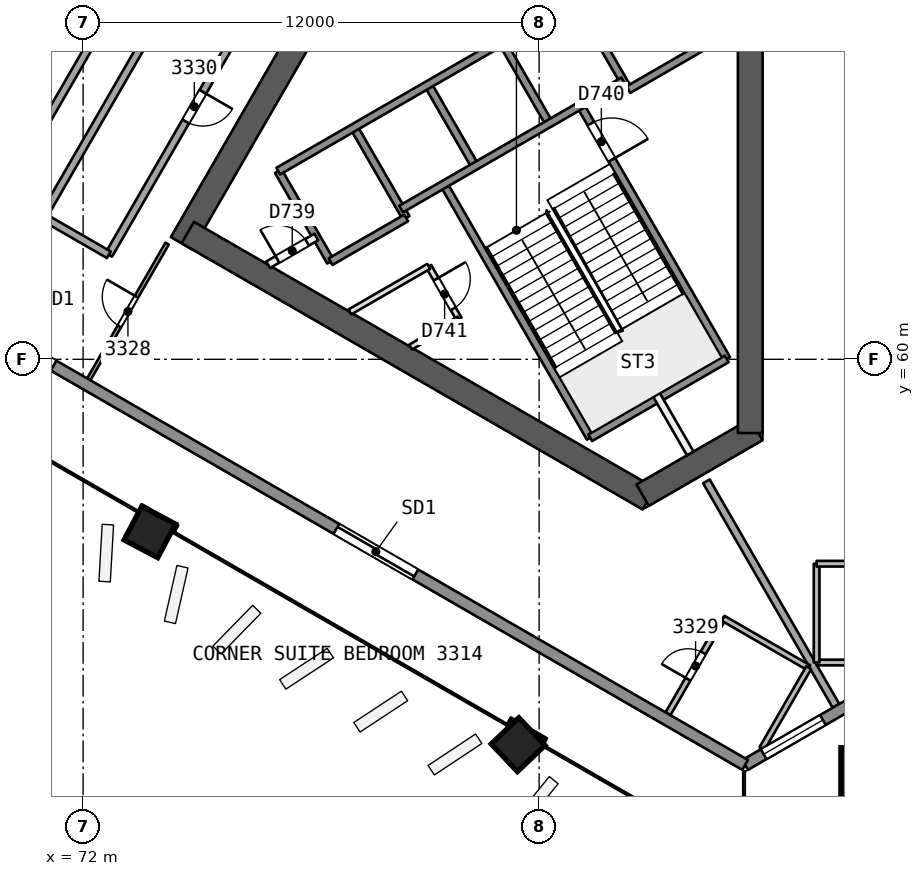
"""IFC4 building model, lengths in metres.
Left out: names, types, materials, properties, quantities, classifications, styles, units other than length and angle.
Written with IfcOpenShell. Run it as: python <this file> out.ifc"""

import sys

from ifc_helpers import new_model, si_unit, direction, frame, frame_2d, origin, origin_2d, place, context, subcontext, project, spatial, rectangle, extrude, element, fill, save


model = new_model("IFC4")
c1 = context("Model", 3, precision=1e-05, world=origin(), true_north=direction((0.0, 1.0)))
c2 = subcontext(c1, "Body", "Model", "MODEL_VIEW")
j1 = project(units=[si_unit("LENGTHUNIT", "METRE"), si_unit("PLANEANGLEUNIT", "RADIAN")], contexts=[c1])
p1 = place(None, origin())
s1 = spatial("IfcSite", under=j1, at=p1, CompositionType="ELEMENT")
p2 = place(p1, origin())
s2 = spatial("IfcBuilding", under=s1, at=p2, CompositionType="ELEMENT")
p3 = place(p2, frame((0.0, 0.0, 136.4)))
s3 = spatial("IfcBuildingStorey", under=s2, at=p3, CompositionType="ELEMENT", Elevation=136.4)
p4 = place(p3, frame((79.688, 71.881, 0.0), z_axis=(0.0, 0.0, 1.0), x_axis=(-0.49999822179, -0.866026430432, 0.0)))
e1 = element("IfcWall", 1, at=p4, inside=s3, PredefinedType="SHEAR", context=c2, shape_type="SweptSolid", body=[
    extrude(rectangle(XDim=10.192, YDim=0.65, at=frame_2d((5.096, 0.0))), origin(), (0.0, 0.0, 1.0), 3.7),
])
p5 = place(p4, frame((0.762, 0.0, 0.0)))
e2 = element("IfcOpeningElement", 2, at=p5, cuts=e1, PredefinedType="OPENING", context=c2, shape_type="SweptSolid", body=[
    extrude(rectangle(XDim=1.2, YDim=2.1, at=frame_2d((0.6, 1.05))), frame((0.0, 0.335, 0.0), z_axis=(0.0, -1.0, 0.0), x_axis=(1.0, 0.0, 0.0)), (0.0, 0.0, 1.0), 0.671),
])
p6 = place(p3, frame((74.754, 63.335, 0.0), z_axis=(0.0, 0.0, 1.0), x_axis=(0.866026250715, -0.49999853307, 0.0)))
e3 = element("IfcWall", 3, at=p6, inside=s3, PredefinedType="SHEAR", context=c2, shape_type="SweptSolid", body=[
    extrude(rectangle(XDim=14.008, YDim=0.65, at=frame_2d((7.004, 0.0))), origin(), (0.0, 0.0, 1.0), 3.7),
])
p7 = place(p3, frame((86.723, 56.425, 0.0), z_axis=(0.0, 0.0, 1.0), x_axis=(0.866031550877, 0.499989352773, 0.0)))
e4 = element("IfcWall", 4, at=p7, inside=s3, PredefinedType="SHEAR", context=c2, shape_type="SweptSolid", body=[
    extrude(rectangle(XDim=3.458, YDim=0.65, at=frame_2d((1.729, 0.0))), origin(), (0.0, 0.0, 1.0), 3.7),
])
p8 = place(p3, frame((89.555, 58.06, 0.0), z_axis=(0.0, 0.0, 1.0), x_axis=(0.0, 1.0, 0.0)))
e5 = element("IfcWall", 5, at=p8, inside=s3, PredefinedType="SHEAR", context=c2, shape_type="SweptSolid", body=[
    extrude(rectangle(XDim=14.146, YDim=0.65, at=frame_2d((7.073, 0.0))), origin(), (0.0, 0.0, 1.0), 3.7),
])
p9 = place(p3, frame((73.753, 55.43, 0.0), z_axis=(0.000857522362, 0.02282328747, 0.99973914708), x_axis=(-0.499939350713, -0.86582493015, 0.020194948363)))
e6 = element("IfcColumn", 6, at=p9, inside=s3, PredefinedType="COLUMN", context=c2, shape_type="SweptSolid", body=[
    extrude(rectangle(XDim=1.0, YDim=1.0, at=origin_2d()), origin(), (0.0, 0.0, 1.0), 3.701),
])
p10 = place(p3, frame((83.457, 49.827, 0.0), z_axis=(-0.008375917711, 0.028095597993, 0.999570148302), x_axis=(-0.499671879215, -0.865980278095, 0.020153686316)))
e7 = element("IfcColumn", 7, at=p10, inside=s3, PredefinedType="COLUMN", context=c2, shape_type="SweptSolid", body=[
    extrude(rectangle(XDim=1.0, YDim=1.0, at=origin_2d()), origin(), (0.0, 0.0, 1.0), 3.702),
])
p11 = place(p3, frame((93.161, 48.544, 0.0), z_axis=(-0.017605877014, 0.030464101799, 0.99938079409), x_axis=(-0.865809063816, -0.500374524745, 1.32647e-07)))
e8 = element("IfcColumn", 8, at=p11, inside=s3, PredefinedType="COLUMN", context=c2, shape_type="SweptSolid", body=[
    extrude(rectangle(XDim=2.4, YDim=2.4, at=origin_2d()), origin(), (0.0, 0.0, 1.0), 3.702),
])
p12 = place(p3, frame((93.788, 52.022, 0.0), z_axis=(0.0, 0.0, 1.0), x_axis=(-1.0, 0.0, 0.0)))
e9 = element("IfcWall", 9, at=p12, inside=s3, PredefinedType="PARTITIONING", context=c2, shape_type="SweptSolid", body=[
    extrude(rectangle(XDim=2.487, YDim=0.15, at=frame_2d((1.243, 0.0))), origin(), (0.0, 0.0, 1.0), 3.25),
])
p13 = place(p3, frame((91.302, 52.022, 0.0), z_axis=(0.0, 0.0, 1.0), x_axis=(0.0, 1.0, 0.0)))
e10 = element("IfcWall", 10, at=p13, inside=s3, PredefinedType="PARTITIONING", context=c2, shape_type="SweptSolid", body=[
    extrude(rectangle(XDim=2.6, YDim=0.15, at=frame_2d((1.3, 0.0))), origin(), (0.0, 0.0, 1.0), 3.25),
])
p14 = place(p3, frame((91.302, 54.622, 0.0), z_axis=(0.0, 0.0, 1.0), x_axis=(1.0, 0.0, 0.0)))
e11 = element("IfcWall", 11, at=p14, inside=s3, PredefinedType="PARTITIONING", context=c2, shape_type="SweptSolid", body=[
    extrude(rectangle(XDim=2.9, YDim=0.15, at=frame_2d((1.45, 0.0))), origin(), (0.0, 0.0, 1.0), 3.25),
])
p15 = place(p14, frame((1.05, 0.0, 0.0)))
e12 = element("IfcOpeningElement", 12, at=p15, cuts=e11, PredefinedType="OPENING", context=c2, shape_type="SweptSolid", body=[
    extrude(rectangle(XDim=0.8, YDim=2.1, at=frame_2d((0.4, 1.05))), frame((0.0, 0.085, 0.0), z_axis=(0.0, -1.0, 0.0), x_axis=(1.0, 0.0, 0.0)), (0.0, 0.0, 1.0), 0.171),
])
p16 = place(p3, frame((88.401, 56.789, 0.0), z_axis=(0.0, 0.0, 1.0), x_axis=(0.499980624807, -0.866036589769, 0.0)))
e13 = element("IfcWall", 13, at=p16, inside=s3, PredefinedType="PARTITIONING", context=c2, shape_type="SweptSolid", body=[
    extrude(rectangle(XDim=6.822, YDim=0.2, at=frame_2d((3.411, 0.0))), origin(), (0.0, 0.0, 1.0), 3.25),
])
p17 = place(p3, frame((68.369, 61.655, 0.0), z_axis=(0.0, 0.0, 1.0), x_axis=(0.499987870058, 0.866032406896, 0.0)))
e14 = element("IfcWall", 14, at=p17, inside=s3, PredefinedType="PARTITIONING", context=c2, shape_type="SweptSolid", body=[
    extrude(rectangle(XDim=12.103, YDim=0.2, at=frame_2d((6.051, 0.0))), origin(), (0.0, 0.0, 1.0), 3.25),
])
p18 = place(p3, frame((72.148, 59.473, 0.0), z_axis=(0.0, 0.0, 1.0), x_axis=(0.499997465321, 0.866026867177, 0.0)))
e15 = element("IfcWall", 15, at=p18, inside=s3, PredefinedType="PARTITIONING", context=c2, shape_type="SweptSolid", body=[
    extrude(rectangle(XDim=4.124, YDim=0.1, at=frame_2d((2.062, 0.0))), origin(), (0.0, 0.0, 1.0), 3.25),
])
p19 = place(p18, frame((1.612, 0.0, 0.0)))
e16 = element("IfcOpeningElement", 16, at=p19, cuts=e15, PredefinedType="OPENING", context=c2, shape_type="SweptSolid", body=[
    extrude(rectangle(XDim=0.9, YDim=2.1, at=frame_2d((0.45, 1.05))), frame((0.0, 0.061, 0.0), z_axis=(0.0, -1.0, 0.0), x_axis=(1.0, 0.0, 0.0)), (0.0, 0.0, 1.0), 0.121),
])
p20 = place(p3, frame((77.176, 70.545, 0.0), z_axis=(0.0, 0.0, 1.0), x_axis=(-0.499990139034, -0.866031096941, 0.0)))
e17 = element("IfcWall", 17, at=p20, inside=s3, PredefinedType="PARTITIONING", context=c2, shape_type="SweptSolid", body=[
    extrude(rectangle(XDim=9.0, YDim=0.2, at=frame_2d((4.5, 0.0))), origin(), (0.0, 0.0, 1.0), 3.25),
])
p21 = place(p20, frame((4.05, 0.0, 0.0)))
e18 = element("IfcOpeningElement", 18, at=p21, cuts=e17, PredefinedType="OPENING", context=c2, shape_type="SweptSolid", body=[
    extrude(rectangle(XDim=0.9, YDim=2.1, at=frame_2d((0.45, 1.05))), frame((0.0, 0.11, 0.0), z_axis=(0.0, -1.0, 0.0), x_axis=(1.0, 0.0, 0.0)), (0.0, 0.0, 1.0), 0.221),
])
p22 = place(p3, frame((72.676, 62.751, 0.0), z_axis=(0.0, 0.0, 1.0), x_axis=(-0.866010750942, 0.50002537861, 0.0)))
e19 = element("IfcWall", 19, at=p22, inside=s3, PredefinedType="PARTITIONING", context=c2, shape_type="SweptSolid", body=[
    extrude(rectangle(XDim=2.0, YDim=0.2, at=frame_2d((1.0, 0.0))), origin(), (0.0, 0.0, 1.0), 3.25),
])
p23 = place(p3, frame((70.944, 63.751, 0.0), z_axis=(0.0, 0.0, 1.0), x_axis=(0.499990139034, 0.866031096941, 0.0)))
e20 = element("IfcWall", 20, at=p23, inside=s3, PredefinedType="PARTITIONING", context=c2, shape_type="SweptSolid", body=[
    extrude(rectangle(XDim=9.0, YDim=0.2, at=frame_2d((4.5, 0.0))), origin(), (0.0, 0.0, 1.0), 3.25),
])
p24 = place(p3, frame((87.391, 50.674, 0.0), z_axis=(0.0, 0.0, 1.0), x_axis=(0.499987231761, 0.866032775405, 0.0)))
e21 = element("IfcWall", 21, at=p24, inside=s3, PredefinedType="PARTITIONING", context=c2, shape_type="SweptSolid", body=[
    extrude(rectangle(XDim=2.9, YDim=0.15, at=frame_2d((1.45, 0.0))), origin(), (0.0, 0.0, 1.0), 3.25),
])
p25 = place(p24, frame((1.05, 0.0, 0.0)))
e22 = element("IfcOpeningElement", 22, at=p25, cuts=e21, PredefinedType="OPENING", context=c2, shape_type="SweptSolid", body=[
    extrude(rectangle(XDim=0.8, YDim=2.1, at=frame_2d((0.4, 1.05))), frame((0.0, 0.085, 0.0), z_axis=(0.0, -1.0, 0.0), x_axis=(1.0, 0.0, 0.0)), (0.0, 0.0, 1.0), 0.171),
])
p26 = place(p3, frame((88.841, 53.185, 0.0), z_axis=(0.0, 0.0, 1.0), x_axis=(0.866021400173, -0.500006934395, 0.0)))
e23 = element("IfcWall", 23, at=p26, inside=s3, PredefinedType="PARTITIONING", context=c2, shape_type="SweptSolid", body=[
    extrude(rectangle(XDim=2.6, YDim=0.15, at=frame_2d((1.3, 0.0))), origin(), (0.0, 0.0, 1.0), 3.25),
])
p27 = place(p3, frame((91.093, 51.885, 0.0), z_axis=(0.0, 0.0, 1.0), x_axis=(-0.499994660107, -0.866028486751, 0.0)))
e24 = element("IfcWall", 24, at=p27, inside=s3, PredefinedType="PARTITIONING", context=c2, shape_type="SweptSolid", body=[
    extrude(rectangle(XDim=2.458, YDim=0.15, at=frame_2d((1.229, 0.0))), origin(), (0.0, 0.0, 1.0), 3.25),
])
p28 = place(p3, frame((94.352, 52.176, 0.0), z_axis=(0.0, 0.0, 1.0), x_axis=(-0.86600207179, -0.500040410022, 0.0)))
e25 = element("IfcWall", 25, at=p28, inside=s3, PredefinedType="SOLIDWALL", context=c2, shape_type="SweptSolid", body=[
    extrude(rectangle(XDim=5.694, YDim=0.3, at=frame_2d((2.847, 0.0))), origin(), (0.0, 0.0, 1.0), 3.25),
])
p29 = place(p28, frame((0.546, 0.0, 0.9)))
e26 = element("IfcOpeningElement", 26, at=p29, cuts=e25, PredefinedType="OPENING", context=c2, shape_type="SweptSolid", body=[
    extrude(rectangle(XDim=1.8, YDim=1.5, at=frame_2d((0.9, 0.75))), frame((0.0, 0.161, 0.0), z_axis=(0.0, -1.0, 0.0), x_axis=(1.0, 0.0, 0.0)), (0.0, 0.0, 1.0), 0.321),
])
p30 = place(p28, frame((3.331, 0.0, 0.9)))
e27 = element("IfcOpeningElement", 27, at=p30, cuts=e25, PredefinedType="OPENING", context=c2, shape_type="SweptSolid", body=[
    extrude(rectangle(XDim=1.8, YDim=1.5, at=frame_2d((0.9, 0.75))), frame((0.0, 0.161, 0.0), z_axis=(0.0, -1.0, 0.0), x_axis=(1.0, 0.0, 0.0)), (0.0, 0.0, 1.0), 0.321),
])
p31 = place(p3, frame((89.421, 49.328, 0.0), z_axis=(0.0, 0.0, 1.0), x_axis=(-0.866024492862, 0.50000157776, 0.0)))
e28 = element("IfcWall", 28, at=p31, inside=s3, PredefinedType="SOLIDWALL", context=c2, shape_type="SweptSolid", body=[
    extrude(rectangle(XDim=55.649, YDim=0.3, at=frame_2d((27.825, 0.0))), origin(), (0.0, 0.0, 1.0), 3.25),
])
p32 = place(p31, frame((26.781, 0.0, 0.0)))
e29 = element("IfcOpeningElement", 29, at=p32, cuts=e28, PredefinedType="OPENING", context=c2, shape_type="SweptSolid", body=[
    extrude(rectangle(XDim=2.4, YDim=2.4, at=frame_2d((1.2, 1.2))), frame((0.0, 0.161, 0.0), z_axis=(0.0, -1.0, 0.0), x_axis=(1.0, 0.0, 0.0)), (0.0, 0.0, 1.0), 0.321),
])
p33 = place(p31, frame((32.392, 0.0, 0.0)))
e30 = element("IfcOpeningElement", 30, at=p33, cuts=e28, PredefinedType="OPENING", context=c2, shape_type="SweptSolid", body=[
    extrude(rectangle(XDim=2.4, YDim=2.4, at=frame_2d((1.2, 1.2))), frame((0.0, 0.161, 0.0), z_axis=(0.0, -1.0, 0.0), x_axis=(1.0, 0.0, 0.0)), (0.0, 0.0, 1.0), 0.321),
])
p34 = place(p31, frame((43.22, 0.0, 0.0)))
e31 = element("IfcOpeningElement", 31, at=p34, cuts=e28, PredefinedType="OPENING", context=c2, shape_type="SweptSolid", body=[
    extrude(rectangle(XDim=2.4, YDim=2.4, at=frame_2d((1.2, 1.2))), frame((0.0, 0.161, 0.0), z_axis=(0.0, -1.0, 0.0), x_axis=(1.0, 0.0, 0.0)), (0.0, 0.0, 1.0), 0.321),
])
p35 = place(p31, frame((21.013, 0.0, 0.0)))
e32 = element("IfcOpeningElement", 32, at=p35, cuts=e28, PredefinedType="OPENING", context=c2, shape_type="SweptSolid", body=[
    extrude(rectangle(XDim=2.4, YDim=2.4, at=frame_2d((1.2, 1.2))), frame((0.0, 0.161, 0.0), z_axis=(0.0, -1.0, 0.0), x_axis=(1.0, 0.0, 0.0)), (0.0, 0.0, 1.0), 0.321),
])
p36 = place(p31, frame((10.021, 0.0, 0.0)))
e33 = element("IfcOpeningElement", 33, at=p36, cuts=e28, PredefinedType="OPENING", context=c2, shape_type="SweptSolid", body=[
    extrude(rectangle(XDim=2.4, YDim=2.4, at=frame_2d((1.2, 1.2))), frame((0.0, 0.161, 0.0), z_axis=(0.0, -1.0, 0.0), x_axis=(1.0, 0.0, 0.0)), (0.0, 0.0, 1.0), 0.321),
])
p37 = place(p3, frame((77.135, 64.952, 0.0), z_axis=(0.0, 0.0, 1.0), x_axis=(0.499996545922, -0.866027397988, 0.0)))
e34 = element("IfcWall", 34, at=p37, inside=s3, PredefinedType="SOLIDWALL", context=c2, shape_type="SweptSolid", body=[
    extrude(rectangle(XDim=2.75, YDim=0.2, at=frame_2d((1.375, 0.0))), origin(), (0.0, 0.0, 1.0), 3.25),
])
p38 = place(p3, frame((81.094, 62.445, 0.0), z_axis=(0.0, 0.0, 1.0), x_axis=(0.499880961361, -0.866094119867, 0.0)))
e35 = element("IfcWall", 35, at=p38, inside=s3, PredefinedType="PARTITIONING", context=c2, shape_type="SweptSolid", body=[
    extrude(rectangle(XDim=1.6, YDim=0.15, at=frame_2d((0.8, 0.0))), origin(), (0.0, 0.0, 1.0), 3.25),
])
p39 = place(p38, frame((0.387, 0.0, 0.0)))
e36 = element("IfcOpeningElement", 36, at=p39, cuts=e35, PredefinedType="OPENING", context=c2, shape_type="SweptSolid", body=[
    extrude(rectangle(XDim=0.9, YDim=2.1, at=frame_2d((0.45, 1.05))), frame((0.0, 0.085, 0.0), z_axis=(0.0, -1.0, 0.0), x_axis=(1.0, 0.0, 0.0)), (0.0, 0.0, 1.0), 0.171),
])
p40 = place(p3, frame((79.127, 66.102, 0.0), z_axis=(0.0, 0.0, 1.0), x_axis=(0.499996545922, -0.866027397988, 0.0)))
e37 = element("IfcWall", 37, at=p40, inside=s3, PredefinedType="SOLIDWALL", context=c2, shape_type="SweptSolid", body=[
    extrude(rectangle(XDim=2.75, YDim=0.2, at=frame_2d((1.375, 0.0))), origin(), (0.0, 0.0, 1.0), 3.25),
])
p41 = place(p3, frame((81.493, 64.604, 0.0), z_axis=(0.0, 0.0, 1.0), x_axis=(0.500006057782, -0.866021906294, 0.0)))
e38 = element("IfcWall", 38, at=p41, inside=s3, PredefinedType="SOLIDWALL", context=c2, shape_type="SweptSolid", body=[
    extrude(rectangle(XDim=7.7, YDim=0.2, at=frame_2d((3.85, 0.0))), origin(), (0.0, 0.0, 1.0), 3.25),
])
p42 = place(p3, frame((81.076, 67.227, 0.0), z_axis=(0.0, 0.0, 1.0), x_axis=(0.50000366821, -0.866023285932, 0.0)))
e39 = element("IfcWall", 39, at=p42, inside=s3, PredefinedType="SOLIDWALL", context=c2, shape_type="SweptSolid", body=[
    extrude(rectangle(XDim=2.48, YDim=0.2, at=frame_2d((1.24, 0.0))), origin(), (0.0, 0.0, 1.0), 3.25),
])
p43 = place(p3, frame((87.09, 59.06, 0.0), z_axis=(0.0, 0.0, 1.0), x_axis=(0.499944938281, -0.866057191349, 0.0)))
e40 = element("IfcWall", 40, at=p43, inside=s3, PredefinedType="PARTITIONING", context=c2, shape_type="SweptSolid", body=[
    extrude(rectangle(XDim=1.773, YDim=0.2, at=frame_2d((0.887, 0.0))), origin(), (0.0, 0.0, 1.0), 3.25),
])
p44 = place(p3, frame((83.024, 68.352, 0.0), z_axis=(0.0, 0.0, 1.0), x_axis=(0.50000366821, -0.866023285932, 0.0)))
e41 = element("IfcWall", 41, at=p44, inside=s3, PredefinedType="SOLIDWALL", context=c2, shape_type="SweptSolid", body=[
    extrude(rectangle(XDim=2.48, YDim=0.2, at=frame_2d((1.24, 0.0))), origin(), (0.0, 0.0, 1.0), 3.25),
])
p45 = place(p3, frame((85.087, 66.679, 0.0), z_axis=(0.0, 0.0, 1.0), x_axis=(0.500019787375, -0.866013979237, 0.0)))
e42 = element("IfcWall", 42, at=p45, inside=s3, PredefinedType="SOLIDWALL", context=c2, shape_type="SweptSolid", body=[
    extrude(rectangle(XDim=7.7, YDim=0.2, at=frame_2d((3.85, 0.0))), origin(), (0.0, 0.0, 1.0), 3.25),
])
p46 = place(p45, frame((0.55, 0.0, 0.0)))
e43 = element("IfcOpeningElement", 43, at=p46, cuts=e42, PredefinedType="OPENING", context=c2, shape_type="SweptSolid", body=[
    extrude(rectangle(XDim=1.1, YDim=2.1, at=frame_2d((0.55, 1.05))), frame((0.0, 0.11, 0.0), z_axis=(0.0, -1.0, 0.0), x_axis=(1.0, 0.0, 0.0)), (0.0, 0.0, 1.0), 0.221),
])
p47 = place(p3, frame((84.973, 69.477, 0.0), z_axis=(0.0, 0.0, 1.0), x_axis=(0.499996545922, -0.866027397988, 0.0)))
e44 = element("IfcWall", 44, at=p47, inside=s3, PredefinedType="SOLIDWALL", context=c2, shape_type="SweptSolid", body=[
    extrude(rectangle(XDim=2.75, YDim=0.2, at=frame_2d((1.375, 0.0))), origin(), (0.0, 0.0, 1.0), 3.25),
])
p48 = place(p3, frame((77.135, 64.952, 0.0), z_axis=(0.0, 0.0, 1.0), x_axis=(0.866031916153, 0.499988720078, 0.0)))
e45 = element("IfcWall", 45, at=p48, inside=s3, PredefinedType="SOLIDWALL", context=c2, shape_type="SweptSolid", body=[
    extrude(rectangle(XDim=11.35, YDim=0.2, at=frame_2d((5.675, 0.0))), origin(), (0.0, 0.0, 1.0), 3.25),
])
p49 = place(p3, frame((76.87, 62.489, 0.0), z_axis=(0.0, 0.0, 1.0), x_axis=(0.866054810376, 0.49994906283, 0.0)))
e46 = element("IfcWall", 46, at=p49, inside=s3, PredefinedType="PARTITIONING", context=c2, shape_type="SweptSolid", body=[
    extrude(rectangle(XDim=1.461, YDim=0.2, at=frame_2d((0.73, 0.0))), origin(), (0.0, 0.0, 1.0), 3.25),
])
p50 = place(p49, frame((0.281, 0.0, 0.0)))
e47 = element("IfcOpeningElement", 47, at=p50, cuts=e46, PredefinedType="OPENING", context=c2, shape_type="SweptSolid", body=[
    extrude(rectangle(XDim=0.9, YDim=2.1, at=frame_2d((0.45, 1.05))), frame((0.0, 0.11, 0.0), z_axis=(0.0, -1.0, 0.0), x_axis=(1.0, 0.0, 0.0)), (0.0, 0.0, 1.0), 0.221),
])
p51 = place(p3, frame((80.367, 63.954, 0.0), z_axis=(0.0, 0.0, 1.0), x_axis=(0.866026575979, 0.499997969693, 0.0)))
e48 = element("IfcWall", 48, at=p51, inside=s3, PredefinedType="SOLIDWALL", context=c2, shape_type="SweptSolid", body=[
    extrude(rectangle(XDim=6.75, YDim=0.2, at=frame_2d((3.375, 0.0))), origin(), (0.0, 0.0, 1.0), 3.25),
])
p52 = place(p3, frame((78.51, 62.57, 0.0), z_axis=(0.0, 0.0, 1.0), x_axis=(0.866053019151, 0.499952165731, 0.0)))
e49 = element("IfcWall", 49, at=p52, inside=s3, PredefinedType="SOLIDWALL", context=c2, shape_type="SweptSolid", body=[
    extrude(rectangle(XDim=2.3, YDim=0.2, at=frame_2d((1.15, 0.0))), origin(), (0.0, 0.0, 1.0), 3.25),
])
p53 = place(p3, frame((86.348, 67.095, 0.0), z_axis=(0.0, 0.0, 1.0), x_axis=(0.86602648383, 0.499998129301, 0.0)))
e50 = element("IfcWall", 50, at=p53, inside=s3, PredefinedType="SOLIDWALL", context=c2, shape_type="SweptSolid", body=[
    extrude(rectangle(XDim=2.3, YDim=0.2, at=frame_2d((1.15, 0.0))), origin(), (0.0, 0.0, 1.0), 3.25),
])
p54 = place(p3, frame((79.02, 61.248, 0.0), z_axis=(0.0, 0.0, 1.0), x_axis=(0.866051471819, 0.499954846121, 0.0)))
e51 = element("IfcWall", 51, at=p54, inside=s3, PredefinedType="PARTITIONING", context=c2, shape_type="SweptSolid", body=[
    extrude(rectangle(XDim=2.395, YDim=0.15, at=frame_2d((1.197, 0.0))), origin(), (0.0, 0.0, 1.0), 3.25),
])
p55 = place(p3, frame((80.62, 60.324, 0.0), z_axis=(0.0, 0.0, 1.0), x_axis=(0.866069507536, 0.49992360228, 0.0)))
e52 = element("IfcWall", 52, at=p55, inside=s3, PredefinedType="PARTITIONING", context=c2, shape_type="SweptSolid", body=[
    extrude(rectangle(XDim=1.471, YDim=0.15, at=frame_2d((0.735, 0.0))), origin(), (0.0, 0.0, 1.0), 3.25),
])
p56 = place(p3, frame((85.343, 57.935, 0.0), z_axis=(0.0, 0.0, 1.0), x_axis=(0.866004344652, 0.500036473714, 0.0)))
e53 = element("IfcWall", 53, at=p56, inside=s3, PredefinedType="SOLIDWALL", context=c2, shape_type="SweptSolid", body=[
    extrude(rectangle(XDim=4.15, YDim=0.2, at=frame_2d((2.075, 0.0))), origin(), (0.0, 0.0, 1.0), 3.25),
])
p57 = place(p19, origin())
e54 = element("IfcDoor", 54, at=p57, inside=s3, OperationType="SINGLE_SWING_RIGHT", PredefinedType="NOTDEFINED", context=c2, shape_type="SweptSolid", body=[
    extrude(rectangle(XDim=0.9, YDim=2.1, at=frame_2d((0.45, 1.05))), frame((0.0, 0.025, 0.0), z_axis=(0.0, -1.0, 0.0), x_axis=(1.0, 0.0, 0.0)), (0.0, 0.0, 1.0), 0.05),
])
fill(e16, e54)
p58 = place(p25, origin())
e55 = element("IfcDoor", 55, at=p58, inside=s3, OperationType="SINGLE_SWING_LEFT", PredefinedType="NOTDEFINED", context=c2, shape_type="SweptSolid", body=[
    extrude(rectangle(XDim=0.8, YDim=2.1, at=frame_2d((0.4, 1.05))), frame((0.0, 0.025, 0.0), z_axis=(0.0, -1.0, 0.0), x_axis=(1.0, 0.0, 0.0)), (0.0, 0.0, 1.0), 0.05),
])
fill(e22, e55)
p59 = place(p21, origin())
e56 = element("IfcDoor", 56, at=p59, inside=s3, OperationType="SINGLE_SWING_LEFT", PredefinedType="NOTDEFINED", context=c2, shape_type="SweptSolid", body=[
    extrude(rectangle(XDim=0.9, YDim=2.1, at=frame_2d((0.45, 1.05))), frame((0.0, 0.025, 0.0), z_axis=(0.0, -1.0, 0.0), x_axis=(1.0, 0.0, 0.0)), (0.0, 0.0, 1.0), 0.05),
])
fill(e18, e56)
p60 = place(p30, origin())
e57 = element("IfcWindow", 57, at=p60, inside=s3, PartitioningType="SINGLE_PANEL", PredefinedType="WINDOW", context=c2, shape_type="SweptSolid", body=[
    extrude(rectangle(XDim=1.8, YDim=1.5, at=frame_2d((0.9, 0.75))), frame((0.0, 0.03, 0.0), z_axis=(0.0, -1.0, 0.0), x_axis=(1.0, 0.0, 0.0)), (0.0, 0.0, 1.0), 0.06),
])
fill(e27, e57)
p61 = place(p35, origin())
e58 = element("IfcDoor", 58, at=p61, inside=s3, OperationType="SLIDING_TO_RIGHT", PredefinedType="NOTDEFINED", context=c2, shape_type="SweptSolid", body=[
    extrude(rectangle(XDim=2.4, YDim=2.4, at=frame_2d((1.2, 1.2))), frame((0.0, 0.025, 0.0), z_axis=(0.0, -1.0, 0.0), x_axis=(1.0, 0.0, 0.0)), (0.0, 0.0, 1.0), 0.05),
])
fill(e32, e58)
p62 = place(p36, origin())
e59 = element("IfcDoor", 59, at=p62, inside=s3, OperationType="SLIDING_TO_LEFT", PredefinedType="NOTDEFINED", context=c2, shape_type="SweptSolid", body=[
    extrude(rectangle(XDim=2.4, YDim=2.4, at=frame_2d((1.2, 1.2))), frame((0.0, 0.025, 0.0), z_axis=(0.0, -1.0, 0.0), x_axis=(1.0, 0.0, 0.0)), (0.0, 0.0, 1.0), 0.05),
])
fill(e33, e59)
p63 = place(p50, origin())
e60 = element("IfcDoor", 60, at=p63, inside=s3, OperationType="SINGLE_SWING_LEFT", PredefinedType="NOTDEFINED", context=c2, shape_type="SweptSolid", body=[
    extrude(rectangle(XDim=0.9, YDim=2.1, at=frame_2d((0.45, 1.05))), frame((0.0, 0.025, 0.0), z_axis=(0.0, -1.0, 0.0), x_axis=(1.0, 0.0, 0.0)), (0.0, 0.0, 1.0), 0.05),
])
fill(e47, e60)
p64 = place(p46, origin())
e61 = element("IfcDoor", 61, at=p64, inside=s3, OperationType="SINGLE_SWING_RIGHT", PredefinedType="NOTDEFINED", context=c2, shape_type="SweptSolid", body=[
    extrude(rectangle(XDim=1.1, YDim=2.1, at=frame_2d((0.55, 1.05))), frame((0.0, 0.025, 0.0), z_axis=(0.0, -1.0, 0.0), x_axis=(1.0, 0.0, 0.0)), (0.0, 0.0, 1.0), 0.05),
])
fill(e43, e61)
p65 = place(p39, origin())
e62 = element("IfcDoor", 62, at=p65, inside=s3, OperationType="SINGLE_SWING_LEFT", PredefinedType="NOTDEFINED", context=c2, shape_type="SweptSolid", body=[
    extrude(rectangle(XDim=0.9, YDim=2.1, at=frame_2d((0.45, 1.05))), frame((0.0, 0.025, 0.0), z_axis=(0.0, -1.0, 0.0), x_axis=(1.0, 0.0, 0.0)), (0.0, 0.0, 1.0), 0.05),
])
fill(e36, e62)
save(model, sys.argv[1])
